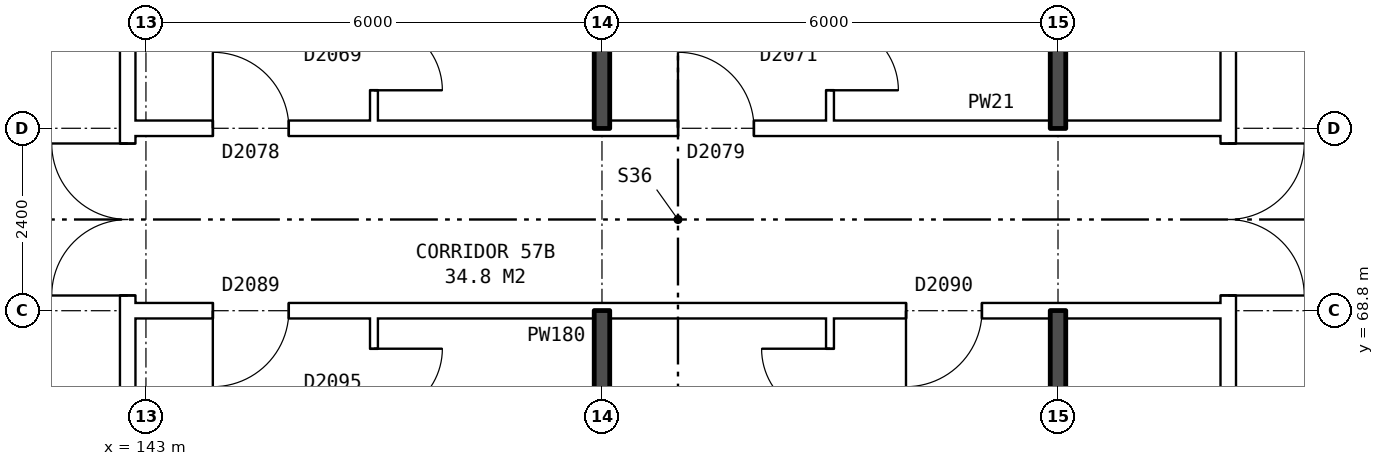
"""IFC4 building model, lengths in metres.
Left out: names, types, materials, properties, quantities, classifications, styles, units other than length and angle.
Written with IfcOpenShell. Run it as: python <this file> out.ifc"""

import sys

from ifc_helpers import new_model, si_unit, direction, frame, frame_2d, origin, place, context, subcontext, project, spatial, rectangle, extrude, element, fill, save


model = new_model("IFC4")
c1 = context("Model", 3, precision=1e-05, world=origin(), true_north=direction((0.0, 1.0)))
c2 = subcontext(c1, "Body", "Model", "MODEL_VIEW")
j1 = project(units=[si_unit("LENGTHUNIT", "METRE"), si_unit("PLANEANGLEUNIT", "RADIAN")], contexts=[c1])
p1 = place(None, origin())
s1 = spatial("IfcSite", under=j1, at=p1, CompositionType="ELEMENT")
p2 = place(p1, origin())
s2 = spatial("IfcBuilding", under=s1, at=p2, CompositionType="ELEMENT")
p3 = place(p2, frame((0.0, 0.0, 202.8)))
s3 = spatial("IfcBuildingStorey", under=s2, at=p3, CompositionType="ELEMENT", Elevation=202.8)
p4 = place(p3, frame((142.76, 63.9, 0.0), z_axis=(0.0, 0.0, 1.0), x_axis=(0.0, 1.0, 0.0)))
e1 = element("IfcWall", 1, at=p4, inside=s3, PredefinedType="PARTITIONING", context=c2, shape_type="SweptSolid", body=[
    extrude(rectangle(XDim=12.2, YDim=0.2, at=frame_2d((6.1, 0.0))), origin(), (0.0, 0.0, 1.0), 2.85),
])
p5 = place(p4, frame((5.1, 0.0, 0.0)))
e2 = element("IfcOpeningElement", 2, at=p5, cuts=e1, PredefinedType="OPENING", context=c2, shape_type="SweptSolid", body=[
    extrude(rectangle(XDim=2.0, YDim=2.1, at=frame_2d((1.0, 1.05))), frame((0.0, 0.11, 0.0), z_axis=(0.0, -1.0, 0.0), x_axis=(1.0, 0.0, 0.0)), (0.0, 0.0, 1.0), 0.22),
])
p6 = place(p3, frame((157.24, 63.9, 0.0), z_axis=(0.0, 0.0, 1.0), x_axis=(0.0, 1.0, 0.0)))
e3 = element("IfcWall", 3, at=p6, inside=s3, PredefinedType="PARTITIONING", context=c2, shape_type="SweptSolid", body=[
    extrude(rectangle(XDim=12.2, YDim=0.2, at=frame_2d((6.1, 0.0))), origin(), (0.0, 0.0, 1.0), 2.85),
])
p7 = place(p6, frame((5.1, 0.0, 0.0)))
e4 = element("IfcOpeningElement", 4, at=p7, cuts=e3, PredefinedType="OPENING", context=c2, shape_type="SweptSolid", body=[
    extrude(rectangle(XDim=2.0, YDim=2.1, at=frame_2d((1.0, 1.05))), frame((0.0, 0.11, 0.0), z_axis=(0.0, -1.0, 0.0), x_axis=(1.0, 0.0, 0.0)), (0.0, 0.0, 1.0), 0.22),
])
p8 = place(p3, frame((142.76, 68.8, 0.0), z_axis=(0.0, 0.0, 1.0), x_axis=(1.0, 0.0, 0.0)))
e5 = element("IfcWall", 5, at=p8, inside=s3, PredefinedType="PARTITIONING", context=c2, shape_type="SweptSolid", body=[
    extrude(rectangle(XDim=14.48, YDim=0.2, at=frame_2d((7.24, 0.0))), origin(), (0.0, 0.0, 1.0), 2.85),
])
p9 = place(p8, frame((1.12, 0.0, 0.0)))
e6 = element("IfcOpeningElement", 6, at=p9, cuts=e5, PredefinedType="OPENING", context=c2, shape_type="SweptSolid", body=[
    extrude(rectangle(XDim=1.0, YDim=2.1, at=frame_2d((0.5, 1.05))), frame((0.0, 0.11, 0.0), z_axis=(0.0, -1.0, 0.0), x_axis=(1.0, 0.0, 0.0)), (0.0, 0.0, 1.0), 0.22),
])
p10 = place(p8, frame((10.24, 0.0, 0.0)))
e7 = element("IfcOpeningElement", 7, at=p10, cuts=e5, PredefinedType="OPENING", context=c2, shape_type="SweptSolid", body=[
    extrude(rectangle(XDim=1.0, YDim=2.1, at=frame_2d((0.5, 1.05))), frame((0.0, 0.11, 0.0), z_axis=(0.0, -1.0, 0.0), x_axis=(1.0, 0.0, 0.0)), (0.0, 0.0, 1.0), 0.22),
])
p11 = place(p3, frame((142.76, 71.2, 0.0), z_axis=(0.0, 0.0, 1.0), x_axis=(1.0, 0.0, 0.0)))
e8 = element("IfcWall", 8, at=p11, inside=s3, PredefinedType="PARTITIONING", context=c2, shape_type="SweptSolid", body=[
    extrude(rectangle(XDim=14.48, YDim=0.2, at=frame_2d((7.24, 0.0))), origin(), (0.0, 0.0, 1.0), 2.85),
])
p12 = place(p11, frame((1.12, 0.0, 0.0)))
e9 = element("IfcOpeningElement", 9, at=p12, cuts=e8, PredefinedType="OPENING", context=c2, shape_type="SweptSolid", body=[
    extrude(rectangle(XDim=1.0, YDim=2.1, at=frame_2d((0.5, 1.05))), frame((0.0, 0.11, 0.0), z_axis=(0.0, -1.0, 0.0), x_axis=(1.0, 0.0, 0.0)), (0.0, 0.0, 1.0), 0.22),
])
p13 = place(p11, frame((7.24, 0.0, 0.0)))
e10 = element("IfcOpeningElement", 10, at=p13, cuts=e8, PredefinedType="OPENING", context=c2, shape_type="SweptSolid", body=[
    extrude(rectangle(XDim=1.0, YDim=2.1, at=frame_2d((0.5, 1.05))), frame((0.0, 0.11, 0.0), z_axis=(0.0, -1.0, 0.0), x_axis=(1.0, 0.0, 0.0)), (0.0, 0.0, 1.0), 0.22),
])
p14 = place(p3, frame((146.0, 54.36, 0.0), z_axis=(0.0, 0.0, 1.0), x_axis=(0.0, 1.0, 0.0)))
e11 = element("IfcWall", 11, at=p14, inside=s3, PredefinedType="PARTITIONING", context=c2, shape_type="SweptSolid", body=[
    extrude(rectangle(XDim=14.34, YDim=0.1, at=frame_2d((7.17, 0.0))), origin(), (0.0, 0.0, 1.0), 2.85),
])
p15 = place(p14, frame((5.5, 0.0, 0.0)))
e12 = element("IfcOpeningElement", 12, at=p15, cuts=e11, PredefinedType="OPENING", context=c2, shape_type="SweptSolid", body=[
    extrude(rectangle(XDim=0.9, YDim=2.1, at=frame_2d((0.45, 1.05))), frame((0.0, 0.06, 0.0), z_axis=(0.0, -1.0, 0.0), x_axis=(1.0, 0.0, 0.0)), (0.0, 0.0, 1.0), 0.12),
])
p16 = place(p14, frame((13.04, 0.0, 0.0)))
e13 = element("IfcOpeningElement", 13, at=p16, cuts=e11, PredefinedType="OPENING", context=c2, shape_type="SweptSolid", body=[
    extrude(rectangle(XDim=0.9, YDim=2.1, at=frame_2d((0.45, 1.05))), frame((0.0, 0.06, 0.0), z_axis=(0.0, -1.0, 0.0), x_axis=(1.0, 0.0, 0.0)), (0.0, 0.0, 1.0), 0.12),
])
p17 = place(p3, frame((146.0, 71.3, 0.0), z_axis=(0.0, 0.0, 1.0), x_axis=(0.0, 1.0, 0.0)))
e14 = element("IfcWall", 14, at=p17, inside=s3, PredefinedType="PARTITIONING", context=c2, shape_type="SweptSolid", body=[
    extrude(rectangle(XDim=14.34, YDim=0.1, at=frame_2d((7.17, 0.0))), origin(), (0.0, 0.0, 1.0), 2.85),
])
p18 = place(p17, frame((5.74, 0.0, 0.0)))
e15 = element("IfcOpeningElement", 15, at=p18, cuts=e14, PredefinedType="OPENING", context=c2, shape_type="SweptSolid", body=[
    extrude(rectangle(XDim=0.9, YDim=2.1, at=frame_2d((0.45, 1.05))), frame((0.0, 0.06, 0.0), z_axis=(0.0, -1.0, 0.0), x_axis=(1.0, 0.0, 0.0)), (0.0, 0.0, 1.0), 0.12),
])
p19 = place(p17, frame((0.4, 0.0, 0.0)))
e16 = element("IfcOpeningElement", 16, at=p19, cuts=e14, PredefinedType="OPENING", context=c2, shape_type="SweptSolid", body=[
    extrude(rectangle(XDim=0.9, YDim=2.1, at=frame_2d((0.45, 1.05))), frame((0.0, 0.06, 0.0), z_axis=(0.0, -1.0, 0.0), x_axis=(1.0, 0.0, 0.0)), (0.0, 0.0, 1.0), 0.12),
])
for number, where, z_axis, x_axis in (
    (17, (149.0, 54.36, 0.0), (0.0, 0.0, 1.0), (0.0, 1.0, 0.0)),
    (18, (149.0, 71.2, 0.0), (0.0, 0.0, 1.0), (0.0, 1.0, 0.0)),
):
    element("IfcWall", number, at=place(p3, frame(where, z_axis=z_axis, x_axis=x_axis)), inside=s3, PredefinedType="SOLIDWALL", context=c2, shape_type="SweptSolid", body=[
        extrude(rectangle(XDim=14.44, YDim=0.2, at=frame_2d((7.22, 0.0))), origin(), (0.0, 0.0, 1.0), 2.85),
    ])
p20 = place(p3, frame((152.0, 54.36, 0.0), z_axis=(0.0, 0.0, 1.0), x_axis=(0.0, 1.0, 0.0)))
e19 = element("IfcWall", 19, at=p20, inside=s3, PredefinedType="PARTITIONING", context=c2, shape_type="SweptSolid", body=[
    extrude(rectangle(XDim=14.34, YDim=0.1, at=frame_2d((7.17, 0.0))), origin(), (0.0, 0.0, 1.0), 2.85),
])
p21 = place(p20, frame((4.2, 0.0, 0.0)))
e20 = element("IfcOpeningElement", 20, at=p21, cuts=e19, PredefinedType="OPENING", context=c2, shape_type="SweptSolid", body=[
    extrude(rectangle(XDim=0.9, YDim=2.1, at=frame_2d((0.45, 1.05))), frame((0.0, 0.06, 0.0), z_axis=(0.0, -1.0, 0.0), x_axis=(1.0, 0.0, 0.0)), (0.0, 0.0, 1.0), 0.12),
])
p22 = place(p20, frame((13.04, 0.0, 0.0)))
e21 = element("IfcOpeningElement", 21, at=p22, cuts=e19, PredefinedType="OPENING", context=c2, shape_type="SweptSolid", body=[
    extrude(rectangle(XDim=0.9, YDim=2.1, at=frame_2d((0.45, 1.05))), frame((0.0, 0.06, 0.0), z_axis=(0.0, -1.0, 0.0), x_axis=(1.0, 0.0, 0.0)), (0.0, 0.0, 1.0), 0.12),
])
p23 = place(p3, frame((152.0, 71.3, 0.0), z_axis=(0.0, 0.0, 1.0), x_axis=(0.0, 1.0, 0.0)))
e22 = element("IfcWall", 22, at=p23, inside=s3, PredefinedType="PARTITIONING", context=c2, shape_type="SweptSolid", body=[
    extrude(rectangle(XDim=14.34, YDim=0.1, at=frame_2d((7.17, 0.0))), origin(), (0.0, 0.0, 1.0), 2.85),
])
p24 = place(p23, frame((7.94, 0.0, 0.0)))
e23 = element("IfcOpeningElement", 23, at=p24, cuts=e22, PredefinedType="OPENING", context=c2, shape_type="SweptSolid", body=[
    extrude(rectangle(XDim=0.9, YDim=2.1, at=frame_2d((0.45, 1.05))), frame((0.0, 0.06, 0.0), z_axis=(0.0, -1.0, 0.0), x_axis=(1.0, 0.0, 0.0)), (0.0, 0.0, 1.0), 0.12),
])
p25 = place(p23, frame((0.4, 0.0, 0.0)))
e24 = element("IfcOpeningElement", 24, at=p25, cuts=e22, PredefinedType="OPENING", context=c2, shape_type="SweptSolid", body=[
    extrude(rectangle(XDim=0.9, YDim=2.1, at=frame_2d((0.45, 1.05))), frame((0.0, 0.06, 0.0), z_axis=(0.0, -1.0, 0.0), x_axis=(1.0, 0.0, 0.0)), (0.0, 0.0, 1.0), 0.12),
])
for number, where, z_axis, x_axis in (
    (25, (155.0, 54.36, 0.0), (0.0, 0.0, 1.0), (0.0, 1.0, 0.0)),
    (26, (155.0, 71.2, 0.0), (0.0, 0.0, 1.0), (0.0, 1.0, 0.0)),
):
    element("IfcWall", number, at=place(p3, frame(where, z_axis=z_axis, x_axis=x_axis)), inside=s3, PredefinedType="SOLIDWALL", context=c2, shape_type="SweptSolid", body=[
        extrude(rectangle(XDim=14.44, YDim=0.2, at=frame_2d((7.22, 0.0))), origin(), (0.0, 0.0, 1.0), 2.85),
    ])
p26 = place(p5, origin())
e27 = element("IfcDoor", 27, at=p26, inside=s3, OperationType="DOUBLE_DOOR_SINGLE_SWING", PredefinedType="DOOR", context=c2, shape_type="SweptSolid", body=[
    extrude(rectangle(XDim=2.0, YDim=2.1, at=frame_2d((1.0, 1.05))), frame((0.0, 0.025, 0.0), z_axis=(0.0, -1.0, 0.0), x_axis=(1.0, 0.0, 0.0)), (0.0, 0.0, 1.0), 0.05),
])
fill(e2, e27)
p27 = place(p7, frame((2.0, 0.0, 0.0), z_axis=(0.0, 0.0, 1.0), x_axis=(-1.0, 0.0, 0.0)))
e28 = element("IfcDoor", 28, at=p27, inside=s3, OperationType="DOUBLE_DOOR_SINGLE_SWING", PredefinedType="DOOR", context=c2, shape_type="SweptSolid", body=[
    extrude(rectangle(XDim=2.0, YDim=2.1, at=frame_2d((1.0, 1.05))), frame((0.0, 0.025, 0.0), z_axis=(0.0, -1.0, 0.0), x_axis=(1.0, 0.0, 0.0)), (0.0, 0.0, 1.0), 0.05),
])
fill(e4, e28)
p28 = place(p9, frame((1.0, 0.0, 0.0), z_axis=(0.0, 0.0, 1.0), x_axis=(-1.0, 0.0, 0.0)))
e29 = element("IfcDoor", 29, at=p28, inside=s3, OperationType="SINGLE_SWING_RIGHT", PredefinedType="DOOR", context=c2, shape_type="SweptSolid", body=[
    extrude(rectangle(XDim=1.0, YDim=2.1, at=frame_2d((0.5, 1.05))), frame((0.0, 0.025, 0.0), z_axis=(0.0, -1.0, 0.0), x_axis=(1.0, 0.0, 0.0)), (0.0, 0.0, 1.0), 0.05),
])
fill(e6, e29)
p29 = place(p16, frame((0.9, 0.0, 0.0), z_axis=(0.0, 0.0, 1.0), x_axis=(-1.0, 0.0, 0.0)))
e30 = element("IfcDoor", 30, at=p29, inside=s3, OperationType="SINGLE_SWING_LEFT", PredefinedType="DOOR", context=c2, shape_type="SweptSolid", body=[
    extrude(rectangle(XDim=0.9, YDim=2.1, at=frame_2d((0.45, 1.05))), frame((0.0, 0.025, 0.0), z_axis=(0.0, -1.0, 0.0), x_axis=(1.0, 0.0, 0.0)), (0.0, 0.0, 1.0), 0.05),
])
fill(e13, e30)
p30 = place(p10, frame((1.0, 0.0, 0.0), z_axis=(0.0, 0.0, 1.0), x_axis=(-1.0, 0.0, 0.0)))
e31 = element("IfcDoor", 31, at=p30, inside=s3, OperationType="SINGLE_SWING_RIGHT", PredefinedType="DOOR", context=c2, shape_type="SweptSolid", body=[
    extrude(rectangle(XDim=1.0, YDim=2.1, at=frame_2d((0.5, 1.05))), frame((0.0, 0.025, 0.0), z_axis=(0.0, -1.0, 0.0), x_axis=(1.0, 0.0, 0.0)), (0.0, 0.0, 1.0), 0.05),
])
fill(e7, e31)
p31 = place(p22, origin())
e32 = element("IfcDoor", 32, at=p31, inside=s3, OperationType="SINGLE_SWING_RIGHT", PredefinedType="DOOR", context=c2, shape_type="SweptSolid", body=[
    extrude(rectangle(XDim=0.9, YDim=2.1, at=frame_2d((0.45, 1.05))), frame((0.0, 0.025, 0.0), z_axis=(0.0, -1.0, 0.0), x_axis=(1.0, 0.0, 0.0)), (0.0, 0.0, 1.0), 0.05),
])
fill(e21, e32)
p32 = place(p12, origin())
e33 = element("IfcDoor", 33, at=p32, inside=s3, OperationType="SINGLE_SWING_LEFT", PredefinedType="DOOR", context=c2, shape_type="SweptSolid", body=[
    extrude(rectangle(XDim=1.0, YDim=2.1, at=frame_2d((0.5, 1.05))), frame((0.0, 0.025, 0.0), z_axis=(0.0, -1.0, 0.0), x_axis=(1.0, 0.0, 0.0)), (0.0, 0.0, 1.0), 0.05),
])
fill(e9, e33)
p33 = place(p19, frame((0.9, 0.0, 0.0), z_axis=(0.0, 0.0, 1.0), x_axis=(-1.0, 0.0, 0.0)))
e34 = element("IfcDoor", 34, at=p33, inside=s3, OperationType="SINGLE_SWING_RIGHT", PredefinedType="DOOR", context=c2, shape_type="SweptSolid", body=[
    extrude(rectangle(XDim=0.9, YDim=2.1, at=frame_2d((0.45, 1.05))), frame((0.0, 0.025, 0.0), z_axis=(0.0, -1.0, 0.0), x_axis=(1.0, 0.0, 0.0)), (0.0, 0.0, 1.0), 0.05),
])
fill(e16, e34)
p34 = place(p13, origin())
e35 = element("IfcDoor", 35, at=p34, inside=s3, OperationType="SINGLE_SWING_LEFT", PredefinedType="DOOR", context=c2, shape_type="SweptSolid", body=[
    extrude(rectangle(XDim=1.0, YDim=2.1, at=frame_2d((0.5, 1.05))), frame((0.0, 0.025, 0.0), z_axis=(0.0, -1.0, 0.0), x_axis=(1.0, 0.0, 0.0)), (0.0, 0.0, 1.0), 0.05),
])
fill(e10, e35)
p35 = place(p25, frame((0.9, 0.0, 0.0), z_axis=(0.0, 0.0, 1.0), x_axis=(-1.0, 0.0, 0.0)))
e36 = element("IfcDoor", 36, at=p35, inside=s3, OperationType="SINGLE_SWING_RIGHT", PredefinedType="DOOR", context=c2, shape_type="SweptSolid", body=[
    extrude(rectangle(XDim=0.9, YDim=2.1, at=frame_2d((0.45, 1.05))), frame((0.0, 0.025, 0.0), z_axis=(0.0, -1.0, 0.0), x_axis=(1.0, 0.0, 0.0)), (0.0, 0.0, 1.0), 0.05),
])
fill(e24, e36)
save(model, sys.argv[1])
